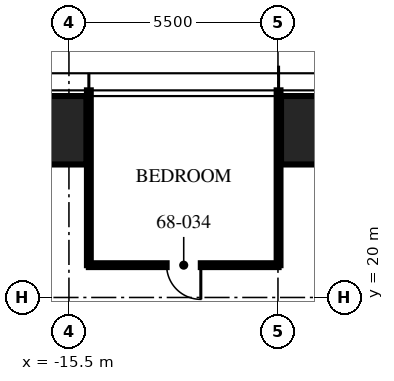
"""IFC4 building model, lengths in metres.
Left out: names, types, materials, properties, quantities, classifications, styles, units other than length and angle.
Written with IfcOpenShell. Run it as: python <this file> out.ifc"""

import sys

from ifc_helpers import new_model, si_unit, direction, frame, frame_2d, origin, origin_2d, place, context, subcontext, project, spatial, rectangle, hollow_rectangle, extrude, element, fill, save


model = new_model("IFC4")
c1 = context("Model", 3, precision=1e-05, world=origin(), true_north=direction((0.0, 1.0)))
c2 = subcontext(c1, "Body", "Model", "MODEL_VIEW")
j1 = project(units=[si_unit("LENGTHUNIT", "METRE"), si_unit("PLANEANGLEUNIT", "RADIAN")], contexts=[c1])
p1 = place(None, origin())
s1 = spatial("IfcSite", under=j1, at=p1, CompositionType="ELEMENT")
p2 = place(p1, origin())
s2 = spatial("IfcBuilding", under=s1, at=p2, CompositionType="ELEMENT")
p3 = place(p2, frame((0.0, 0.0, 270.75)))
s3 = spatial("IfcBuildingStorey", under=s2, at=p3, CompositionType="ELEMENT", Elevation=270.75)
for number, where, z_axis, x_axis in (
    (1, (-16.64, 24.4, 0.0), (0.0, 0.0, 1.0), (1.0, 0.0, 0.0)),
    (2, (-8.32, 24.4, 0.0), (0.0, 0.0, 1.0), (1.0, 0.0, 0.0)),
):
    element("IfcColumn", number, at=place(p3, frame(where, z_axis=z_axis, x_axis=x_axis)), inside=s3, PredefinedType="COLUMN", context=c2, shape_type="SweptSolid", body=[
        extrude(hollow_rectangle(XDim=3.2, YDim=1.8, WallThickness=0.14, at=origin_2d()), origin(), (0.0, 0.0, 1.0), 3.75),
    ])
for number, where, z_axis, x_axis in (
    (3, (-9.984, 20.85, 0.0), (0.0, 0.0, 1.0), (0.0, 1.0, 0.0)),
    (4, (-14.976, 20.85, 0.0), (0.0, 0.0, 1.0), (0.0, 1.0, 0.0)),
):
    element("IfcWall", number, at=place(p3, frame(where, z_axis=z_axis, x_axis=x_axis)), inside=s3, PredefinedType="PARTITIONING", context=c2, shape_type="SweptSolid", body=[
        extrude(rectangle(XDim=4.6, YDim=0.1, at=frame_2d((2.3, 0.0))), origin(), (0.0, 0.0, 1.0), 2.81),
    ])
p4 = place(p3, frame((-9.984, 20.85, 0.0), z_axis=(0.0, 0.0, 1.0), x_axis=(-1.0, 0.0, 0.0)))
e5 = element("IfcWall", 5, at=p4, inside=s3, PredefinedType="PARTITIONING", context=c2, shape_type="SweptSolid", body=[
    extrude(rectangle(XDim=4.992, YDim=0.1, at=frame_2d((2.496, 0.0))), origin(), (0.0, 0.0, 1.0), 2.71),
])
p5 = place(p4, frame((2.046, 0.0, 0.0)))
e6 = element("IfcOpeningElement", 6, at=p5, cuts=e5, PredefinedType="OPENING", context=c2, shape_type="SweptSolid", body=[
    extrude(rectangle(XDim=0.9, YDim=2.1, at=frame_2d((0.45, 1.05))), frame((0.0, 0.06, 0.0), z_axis=(0.0, -1.0, 0.0), x_axis=(1.0, 0.0, 0.0)), (0.0, 0.0, 1.0), 0.12),
])
p6 = place(p5, origin())
e7 = element("IfcDoor", 7, at=p6, inside=s3, OperationType="SINGLE_SWING_LEFT", PredefinedType="DOOR", context=c2, shape_type="SweptSolid", body=[
    extrude(rectangle(XDim=0.9, YDim=2.1, at=frame_2d((0.45, 1.05))), frame((0.0, 0.025, 0.0), z_axis=(0.0, -1.0, 0.0), x_axis=(1.0, 0.0, 0.0)), (0.0, 0.0, 1.0), 0.05),
])
fill(e6, e7)
save(model, sys.argv[1])
